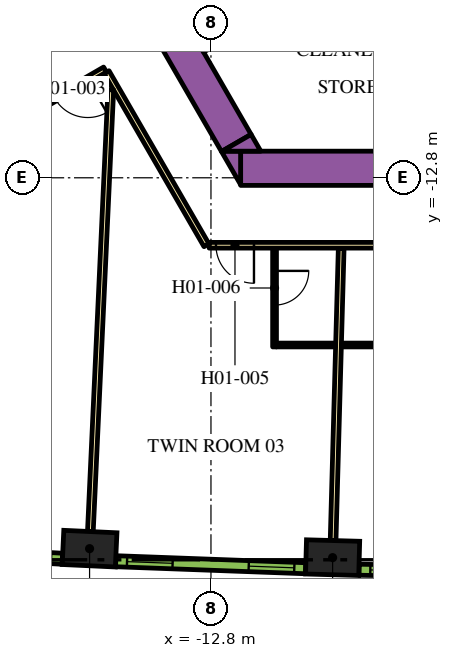
"""IFC4 building model, lengths in metres.
Left out: names, types, materials, properties, quantities, classifications, styles, units other than length and angle.
Written with IfcOpenShell. Run it as: python <this file> out.ifc"""

import sys

from ifc_helpers import new_model, si_unit, direction, frame, frame_2d, origin, origin_2d, place, context, subcontext, project, spatial, polyline, rectangle, outline, extrude, element, fill, save


model = new_model("IFC4")
c1 = context("Model", 3, precision=1e-05, world=origin(), true_north=direction((0.0, 1.0)))
c2 = subcontext(c1, "Body", "Model", "MODEL_VIEW")
j1 = project(units=[si_unit("LENGTHUNIT", "METRE"), si_unit("PLANEANGLEUNIT", "RADIAN")], contexts=[c1])
p1 = place(None, origin())
s1 = spatial("IfcSite", under=j1, at=p1, CompositionType="ELEMENT")
p2 = place(p1, origin())
s2 = spatial("IfcBuilding", under=s1, at=p2, CompositionType="ELEMENT")
p3 = place(p2, frame((0.0, 0.0, 31.5)))
s3 = spatial("IfcBuildingStorey", under=s2, at=p3, CompositionType="ELEMENT", Elevation=31.5)
for number, where, z_axis, x_axis in (
    (1, (-15.994, -22.558, 0.0), (0.0, 0.0, 1.0), (0.999, -0.046, 0.0)),
    (2, (-9.599, -22.795, 0.0), (0.0, 0.0, 1.0), (1.0, -0.028, 0.0)),
):
    element("IfcColumn", number, at=place(p3, frame(where, z_axis=z_axis, x_axis=x_axis)), inside=s3, PredefinedType="COLUMN", context=c2, shape_type="SweptSolid", body=[
        extrude(rectangle(XDim=1.4, YDim=0.9, at=origin_2d()), origin(), (0.0, 0.0, 1.0), 3.9),
    ])
p4 = place(p3, frame((-12.019, -12.55, 0.0), z_axis=(0.0, 0.0, 1.0), x_axis=(1.0, 0.0, 0.0)))
e3 = element("IfcWall", 3, at=p4, inside=s3, PredefinedType="SOLIDWALL", context=c2, shape_type="SweptSolid", body=[
    extrude(rectangle(XDim=21.63, YDim=0.9, at=frame_2d((10.815, 0.0))), origin(), (0.0, 0.0, 1.0), 3.9),
])
p5 = place(p3, origin())
e4 = element("IfcWall", 4, at=p5, inside=s3, PredefinedType="SOLIDWALL", context=c2, shape_type="SweptSolid", body=[
    extrude(outline(polyline([(-12.529, -12.1), (-12.021, -12.1), (-12.021, -12.98), (-12.529, -12.1)])), origin(), (0.0, 0.0, 1.0), 3.9),
])
p6 = place(p3, frame((-12.134, -11.883, 0.0), z_axis=(0.0, 0.0, 1.0), x_axis=(-0.500005339912, 0.866022320763, 0.0)))
e5 = element("IfcWall", 5, at=p6, inside=s3, PredefinedType="SOLIDWALL", context=c2, shape_type="SweptSolid", body=[
    extrude(rectangle(XDim=9.488, YDim=0.9, at=frame_2d((4.744, 0.0))), origin(), (0.0, 0.0, 1.0), 3.9),
])
e6 = element("IfcWall", 6, at=p5, inside=s3, PredefinedType="SOLIDWALL", context=c2, shape_type="SweptSolid", body=[
    extrude(outline(polyline([(-11.489, -12.1), (-12.505, -12.1), (-11.743, -11.66), (-11.489, -12.1)])), origin(), (0.0, 0.0, 1.0), 3.9),
])
p7 = place(p3, frame((-30.463, -16.635, 0.0), z_axis=(0.0, 0.0, 1.0), x_axis=(0.866022394896, 0.500005211512, 0.0)))
e7 = element("IfcWall", 7, at=p7, inside=s3, PredefinedType="PARTITIONING", context=c2, shape_type="SweptSolid", body=[
    extrude(rectangle(XDim=16.144, YDim=0.15, at=frame_2d((8.072, 0.0))), origin(), (0.0, 0.0, 1.0), 2.75),
])
p8 = place(p7, frame((11.004, 0.0, 0.0)))
e8 = element("IfcOpeningElement", 8, at=p8, cuts=e7, PredefinedType="OPENING", context=c2, shape_type="SweptSolid", body=[
    extrude(rectangle(XDim=1.0, YDim=2.1, at=frame_2d((0.5, 1.05))), frame((0.0, 0.085, 0.0), z_axis=(0.0, -1.0, 0.0), x_axis=(1.0, 0.0, 0.0)), (0.0, 0.0, 1.0), 0.17),
])
p9 = place(p7, frame((7.274, 0.0, 0.0)))
e9 = element("IfcOpeningElement", 9, at=p9, cuts=e7, PredefinedType="OPENING", context=c2, shape_type="SweptSolid", body=[
    extrude(rectangle(XDim=1.0, YDim=2.1, at=frame_2d((0.5, 1.05))), frame((0.0, 0.085, 0.0), z_axis=(0.0, -1.0, 0.0), x_axis=(1.0, 0.0, 0.0)), (0.0, 0.0, 1.0), 0.17),
])
p10 = place(p3, frame((-15.587, -9.952, 0.0), z_axis=(0.0, 0.0, 1.0), x_axis=(-0.866022197818, -0.500005552856, 0.0)))
e10 = element("IfcWall", 10, at=p10, inside=s3, PredefinedType="PARTITIONING", context=c2, shape_type="SweptSolid", body=[
    extrude(rectangle(XDim=16.224, YDim=0.15, at=frame_2d((8.112, 0.0))), origin(), (0.0, 0.0, 1.0), 2.75),
])
p11 = place(p10, frame((7.949, 0.0, 0.0)))
e11 = element("IfcOpeningElement", 11, at=p11, cuts=e10, PredefinedType="OPENING", context=c2, shape_type="SweptSolid", body=[
    extrude(rectangle(XDim=1.0, YDim=2.1, at=frame_2d((0.5, 1.05))), frame((0.0, 0.085, 0.0), z_axis=(0.0, -1.0, 0.0), x_axis=(1.0, 0.0, 0.0)), (0.0, 0.0, 1.0), 0.17),
])
p12 = place(p10, frame((0.525, 0.0, 0.0)))
e12 = element("IfcOpeningElement", 12, at=p12, cuts=e10, PredefinedType="OPENING", context=c2, shape_type="SweptSolid", body=[
    extrude(rectangle(XDim=1.0, YDim=2.1, at=frame_2d((0.5, 1.05))), frame((0.0, 0.085, 0.0), z_axis=(0.0, -1.0, 0.0), x_axis=(1.0, 0.0, 0.0)), (0.0, 0.0, 1.0), 0.17),
])
p13 = place(p3, frame((-12.918, -14.575, 0.0), z_axis=(0.0, 0.0, 1.0), x_axis=(-0.500009150678, 0.866020120573, 0.0)))
e13 = element("IfcWall", 13, at=p13, inside=s3, PredefinedType="PARTITIONING", context=c2, shape_type="SweptSolid", body=[
    extrude(rectangle(XDim=5.258, YDim=0.15, at=frame_2d((2.629, 0.0))), origin(), (0.0, 0.0, 1.0), 2.75),
])
p14 = place(p3, frame((12.918, -14.575, 0.0), z_axis=(0.0, 0.0, 1.0), x_axis=(-1.0, 0.0, 0.0)))
e14 = element("IfcWall", 14, at=p14, inside=s3, PredefinedType="PARTITIONING", context=c2, shape_type="SweptSolid", body=[
    extrude(rectangle(XDim=25.766, YDim=0.15, at=frame_2d((12.883, 0.0))), origin(), (0.0, 0.0, 1.0), 2.75),
])
p15 = place(p14, frame((24.586, 0.0, 0.0)))
e15 = element("IfcOpeningElement", 15, at=p15, cuts=e14, PredefinedType="OPENING", context=c2, shape_type="SweptSolid", body=[
    extrude(rectangle(XDim=1.0, YDim=2.1, at=frame_2d((0.5, 1.05))), frame((0.0, 0.085, 0.0), z_axis=(0.0, -1.0, 0.0), x_axis=(1.0, 0.0, 0.0)), (0.0, 0.0, 1.0), 0.17),
])
p16 = place(p14, frame((16.195, 0.0, 0.0)))
e16 = element("IfcOpeningElement", 16, at=p16, cuts=e14, PredefinedType="OPENING", context=c2, shape_type="SweptSolid", body=[
    extrude(rectangle(XDim=1.0, YDim=2.1, at=frame_2d((0.5, 1.05))), frame((0.0, 0.085, 0.0), z_axis=(0.0, -1.0, 0.0), x_axis=(1.0, 0.0, 0.0)), (0.0, 0.0, 1.0), 0.17),
])
p17 = place(p14, frame((14.066, 0.0, 0.0)))
e17 = element("IfcOpeningElement", 17, at=p17, cuts=e14, PredefinedType="OPENING", context=c2, shape_type="SweptSolid", body=[
    extrude(rectangle(XDim=0.9, YDim=2.1, at=frame_2d((0.45, 1.05))), frame((0.0, 0.085, 0.0), z_axis=(0.0, -1.0, 0.0), x_axis=(1.0, 0.0, 0.0)), (0.0, 0.0, 1.0), 0.17),
])
p18 = place(p14, frame((6.824, 0.0, 0.0)))
e18 = element("IfcOpeningElement", 18, at=p18, cuts=e14, PredefinedType="OPENING", context=c2, shape_type="SweptSolid", body=[
    extrude(rectangle(XDim=1.0, YDim=2.1, at=frame_2d((0.5, 1.05))), frame((0.0, 0.085, 0.0), z_axis=(0.0, -1.0, 0.0), x_axis=(1.0, 0.0, 0.0)), (0.0, 0.0, 1.0), 0.17),
])
p19 = place(p14, frame((5.517, 0.0, 0.0)))
e19 = element("IfcOpeningElement", 19, at=p19, cuts=e14, PredefinedType="OPENING", context=c2, shape_type="SweptSolid", body=[
    extrude(rectangle(XDim=1.0, YDim=2.1, at=frame_2d((0.5, 1.05))), frame((0.0, 0.085, 0.0), z_axis=(0.0, -1.0, 0.0), x_axis=(1.0, 0.0, 0.0)), (0.0, 0.0, 1.0), 0.17),
])
p20 = place(p3, frame((-15.973, -22.109, 0.0), z_axis=(0.0, 0.0, 1.0), x_axis=(0.046191717129, 0.998932592955, 0.0)))
e20 = element("IfcWall", 20, at=p20, inside=s3, PredefinedType="PARTITIONING", context=c2, shape_type="SweptSolid", body=[
    extrude(rectangle(XDim=11.638, YDim=0.15, at=frame_2d((5.819, 0.0))), origin(), (0.0, 0.0, 1.0), 2.75),
])
p21 = place(p3, frame((-9.586, -22.345, 0.0), z_axis=(0.0, 0.0, 1.0), x_axis=(0.027722115646, 0.999615668297, 0.0)))
e21 = element("IfcWall", 21, at=p21, inside=s3, PredefinedType="PARTITIONING", context=c2, shape_type="SweptSolid", body=[
    extrude(rectangle(XDim=7.688, YDim=0.15, at=frame_2d((3.844, 0.0))), origin(), (0.0, 0.0, 1.0), 2.75),
])
p22 = place(p3, frame((-11.127, -14.65, 0.0), z_axis=(0.0, 0.0, 1.0), x_axis=(0.0, -1.0, 0.0)))
e22 = element("IfcWall", 22, at=p22, inside=s3, PredefinedType="PARTITIONING", context=c2, shape_type="SweptSolid", body=[
    extrude(rectangle(XDim=2.6, YDim=0.1, at=frame_2d((1.3, 0.0))), origin(), (0.0, 0.0, 1.0), 2.75),
])
p23 = place(p22, frame((0.6, 0.0, 0.0)))
e23 = element("IfcOpeningElement", 23, at=p23, cuts=e22, PredefinedType="OPENING", context=c2, shape_type="SweptSolid", body=[
    extrude(rectangle(XDim=0.9, YDim=2.1, at=frame_2d((0.45, 1.05))), frame((0.0, 0.06, 0.0), z_axis=(0.0, -1.0, 0.0), x_axis=(1.0, 0.0, 0.0)), (0.0, 0.0, 1.0), 0.12),
])
p24 = place(p3, frame((-11.077, -17.2, 0.0), z_axis=(0.0, 0.0, 1.0), x_axis=(1.0, 0.0, 0.0)))
e24 = element("IfcWall", 24, at=p24, inside=s3, PredefinedType="PARTITIONING", context=c2, shape_type="SweptSolid", body=[
    extrude(rectangle(XDim=1.55, YDim=0.1, at=frame_2d((0.775, 0.0))), origin(), (0.0, 0.0, 1.0), 2.75),
])
p25 = place(p3, frame((-7.669, -17.2, 0.0), z_axis=(0.0, 0.0, 1.0), x_axis=(-1.0, 0.0, 0.0)))
e25 = element("IfcWall", 25, at=p25, inside=s3, PredefinedType="PARTITIONING", context=c2, shape_type="SweptSolid", body=[
    extrude(rectangle(XDim=1.69, YDim=0.1, at=frame_2d((0.845, 0.0))), origin(), (0.0, 0.0, 1.0), 2.75),
])
p26 = place(p3, frame((-21.701, -22.547, 0.0), z_axis=(0.0, 0.0, 1.0), x_axis=(0.998464708705, -0.055391564976, 0.0)))
e26 = element("IfcWall", 26, at=p26, inside=s3, PredefinedType="SOLIDWALL", context=c2, shape_type="SweptSolid", body=[
    extrude(rectangle(XDim=4.998, YDim=0.29, at=frame_2d((2.499, 0.0))), origin(), (0.0, 0.0, 1.0), 3.65),
])
p27 = place(p26, frame((0.297, 0.0, 0.9)))
e27 = element("IfcOpeningElement", 27, at=p27, cuts=e26, PredefinedType="OPENING", context=c2, shape_type="SweptSolid", body=[
    extrude(rectangle(XDim=1.2, YDim=2.15, at=frame_2d((0.6, 1.075))), frame((0.0, 0.155, 0.0), z_axis=(0.0, -1.0, 0.0), x_axis=(1.0, 0.0, 0.0)), (0.0, 0.0, 1.0), 0.31),
])
p28 = place(p26, frame((3.501, 0.0, 0.9)))
e28 = element("IfcOpeningElement", 28, at=p28, cuts=e26, PredefinedType="OPENING", context=c2, shape_type="SweptSolid", body=[
    extrude(rectangle(XDim=1.2, YDim=2.15, at=frame_2d((0.6, 1.075))), frame((0.0, 0.155, 0.0), z_axis=(0.0, -1.0, 0.0), x_axis=(1.0, 0.0, 0.0)), (0.0, 0.0, 1.0), 0.31),
])
p29 = place(p3, frame((-15.305, -22.889, 0.0), z_axis=(0.0, 0.0, 1.0), x_axis=(0.999317974969, -0.036926750529, 0.0)))
e29 = element("IfcWall", 29, at=p29, inside=s3, PredefinedType="SOLIDWALL", context=c2, shape_type="SweptSolid", body=[
    extrude(rectangle(XDim=4.998, YDim=0.29, at=frame_2d((2.499, 0.0))), origin(), (0.0, 0.0, 1.0), 3.65),
])
p30 = place(p29, frame((0.297, 0.0, 0.9)))
e30 = element("IfcOpeningElement", 30, at=p30, cuts=e29, PredefinedType="OPENING", context=c2, shape_type="SweptSolid", body=[
    extrude(rectangle(XDim=1.2, YDim=2.15, at=frame_2d((0.6, 1.075))), frame((0.0, 0.155, 0.0), z_axis=(0.0, -1.0, 0.0), x_axis=(1.0, 0.0, 0.0)), (0.0, 0.0, 1.0), 0.31),
])
p31 = place(p29, frame((3.501, 0.0, 0.9)))
e31 = element("IfcOpeningElement", 31, at=p31, cuts=e29, PredefinedType="OPENING", context=c2, shape_type="SweptSolid", body=[
    extrude(rectangle(XDim=1.2, YDim=2.15, at=frame_2d((0.6, 1.075))), frame((0.0, 0.155, 0.0), z_axis=(0.0, -1.0, 0.0), x_axis=(1.0, 0.0, 0.0)), (0.0, 0.0, 1.0), 0.31),
])
p32 = place(p3, frame((-8.904, -23.113, 0.0), z_axis=(0.0, 0.0, 1.0), x_axis=(0.999829529479, -0.018463801951, 0.0)))
e32 = element("IfcWall", 32, at=p32, inside=s3, PredefinedType="SOLIDWALL", context=c2, shape_type="SweptSolid", body=[
    extrude(rectangle(XDim=4.998, YDim=0.29, at=frame_2d((2.499, 0.0))), origin(), (0.0, 0.0, 1.0), 3.65),
])
p33 = place(p32, frame((0.297, 0.0, 0.9)))
e33 = element("IfcOpeningElement", 33, at=p33, cuts=e32, PredefinedType="OPENING", context=c2, shape_type="SweptSolid", body=[
    extrude(rectangle(XDim=1.2, YDim=2.15, at=frame_2d((0.6, 1.075))), frame((0.0, 0.155, 0.0), z_axis=(0.0, -1.0, 0.0), x_axis=(1.0, 0.0, 0.0)), (0.0, 0.0, 1.0), 0.31),
])
p34 = place(p32, frame((3.501, 0.0, 0.9)))
e34 = element("IfcOpeningElement", 34, at=p34, cuts=e32, PredefinedType="OPENING", context=c2, shape_type="SweptSolid", body=[
    extrude(rectangle(XDim=1.2, YDim=2.15, at=frame_2d((0.6, 1.075))), frame((0.0, 0.155, 0.0), z_axis=(0.0, -1.0, 0.0), x_axis=(1.0, 0.0, 0.0)), (0.0, 0.0, 1.0), 0.31),
])
p35 = place(p12, origin())
e35 = element("IfcDoor", 35, at=p35, inside=s3, OperationType="SINGLE_SWING_LEFT", PredefinedType="DOOR", context=c2, shape_type="SweptSolid", body=[
    extrude(rectangle(XDim=1.0, YDim=2.1, at=frame_2d((0.5, 1.05))), frame((0.0, 0.025, 0.0), z_axis=(0.0, -1.0, 0.0), x_axis=(1.0, 0.0, 0.0)), (0.0, 0.0, 1.0), 0.05),
])
fill(e12, e35)
p36 = place(p15, origin())
e36 = element("IfcDoor", 36, at=p36, inside=s3, OperationType="SINGLE_SWING_RIGHT", PredefinedType="DOOR", context=c2, shape_type="SweptSolid", body=[
    extrude(rectangle(XDim=1.0, YDim=2.1, at=frame_2d((0.5, 1.05))), frame((0.0, 0.025, 0.0), z_axis=(0.0, -1.0, 0.0), x_axis=(1.0, 0.0, 0.0)), (0.0, 0.0, 1.0), 0.05),
])
fill(e15, e36)
p37 = place(p23, origin())
e37 = element("IfcDoor", 37, at=p37, inside=s3, OperationType="SINGLE_SWING_RIGHT", PredefinedType="DOOR", context=c2, shape_type="SweptSolid", body=[
    extrude(rectangle(XDim=0.9, YDim=2.1, at=frame_2d((0.45, 1.05))), frame((0.0, 0.025, 0.0), z_axis=(0.0, -1.0, 0.0), x_axis=(1.0, 0.0, 0.0)), (0.0, 0.0, 1.0), 0.05),
])
fill(e23, e37)
p38 = place(p30, origin())
e38 = element("IfcWindow", 38, at=p38, inside=s3, PartitioningType="DOUBLE_PANEL_VERTICAL", PredefinedType="WINDOW", context=c2, shape_type="SweptSolid", body=[
    extrude(rectangle(XDim=1.2, YDim=2.15, at=frame_2d((0.6, 1.075))), frame((0.0, 0.015, 0.0), z_axis=(0.0, -1.0, 0.0), x_axis=(1.0, 0.0, 0.0)), (0.0, 0.0, 1.0), 0.06),
])
fill(e30, e38)
p39 = place(p31, origin())
e39 = element("IfcWindow", 39, at=p39, inside=s3, PartitioningType="DOUBLE_PANEL_VERTICAL", PredefinedType="WINDOW", context=c2, shape_type="SweptSolid", body=[
    extrude(rectangle(XDim=1.2, YDim=2.15, at=frame_2d((0.6, 1.075))), frame((0.0, 0.015, 0.0), z_axis=(0.0, -1.0, 0.0), x_axis=(1.0, 0.0, 0.0)), (0.0, 0.0, 1.0), 0.06),
])
fill(e31, e39)
p40 = place(p33, origin())
e40 = element("IfcWindow", 40, at=p40, inside=s3, PartitioningType="DOUBLE_PANEL_VERTICAL", PredefinedType="WINDOW", context=c2, shape_type="SweptSolid", body=[
    extrude(rectangle(XDim=1.2, YDim=2.15, at=frame_2d((0.6, 1.075))), frame((0.0, 0.015, 0.0), z_axis=(0.0, -1.0, 0.0), x_axis=(1.0, 0.0, 0.0)), (0.0, 0.0, 1.0), 0.06),
])
fill(e33, e40)
save(model, sys.argv[1])
